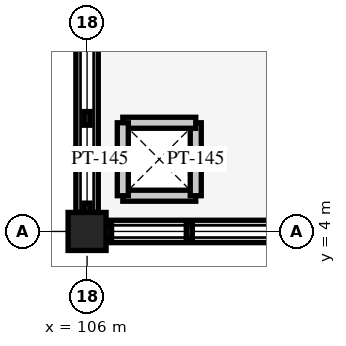
"""IFC4 building model, lengths in metres.
Left out: names, types, materials, properties, quantities, classifications, styles, units other than length and angle.
Written with IfcOpenShell. Run it as: python <this file> out.ifc"""

import sys

from ifc_helpers import new_model, si_unit, direction, frame, frame_2d, origin, origin_2d, place, context, subcontext, project, spatial, rectangle, extrude, element, save


model = new_model("IFC4")
c1 = context("Model", 3, precision=1e-05, world=origin(), true_north=direction((0.0, 1.0)))
c2 = subcontext(c1, "Body", "Model", "MODEL_VIEW")
j1 = project(units=[si_unit("LENGTHUNIT", "METRE"), si_unit("PLANEANGLEUNIT", "RADIAN")], contexts=[c1])
p1 = place(None, origin())
s1 = spatial("IfcSite", under=j1, at=p1, CompositionType="ELEMENT")
p2 = place(p1, origin())
s2 = spatial("IfcBuilding", under=s1, at=p2, CompositionType="ELEMENT")
p3 = place(p2, frame((0.0, 0.0, 4.5)))
s3 = spatial("IfcBuildingStorey", under=s2, at=p3, CompositionType="ELEMENT", Elevation=4.5)
p4 = place(p3, frame((106.0, 4.0, 0.0), z_axis=(0.0, 0.0, 1.0), x_axis=(1.0, 0.0, 0.0)))
e1 = element("IfcColumn", 1, at=p4, inside=s3, PredefinedType="COLUMN", context=c2, shape_type="SweptSolid", body=[
    extrude(rectangle(XDim=0.5, YDim=0.5, at=origin_2d()), origin(), (0.0, 0.0, 1.0), 4.5),
])
p5 = place(p3, frame((111.725, 4.0, 0.0), z_axis=(0.0, 0.0, 1.0), x_axis=(-1.0, 0.0, 0.0)))
e2 = element("IfcWall", 2, at=p5, inside=s3, PredefinedType="SOLIDWALL", context=c2, shape_type="SweptSolid", body=[
    extrude(rectangle(XDim=5.475, YDim=0.295, at=frame_2d((2.738, 0.0))), origin(), (0.0, 0.0, 1.0), 0.16),
])
p6 = place(p3, frame((106.0, 4.25, 0.0), z_axis=(0.0, 0.0, 1.0), x_axis=(0.0, 1.0, 0.0)))
e3 = element("IfcWall", 3, at=p6, inside=s3, PredefinedType="SOLIDWALL", context=c2, shape_type="SweptSolid", body=[
    extrude(rectangle(XDim=4.95, YDim=0.295, at=frame_2d((2.475, 0.0))), origin(), (0.0, 0.0, 1.0), 0.26),
])
for number, where, z_axis, x_axis in (
    (4, (106.47, 4.47, 0.0), (0.0, 0.0, 1.0), (1.0, 0.0, 0.0)),
    (5, (107.43, 4.47, 0.0), (0.0, 0.0, 1.0), (0.0, 1.0, 0.0)),
    (6, (107.43, 5.43, 0.0), (0.0, 0.0, 1.0), (-1.0, 0.0, 0.0)),
    (7, (106.47, 5.43, 0.0), (0.0, 0.0, 1.0), (0.0, -1.0, 0.0)),
):
    element("IfcWall", number, at=place(p3, frame(where, z_axis=z_axis, x_axis=x_axis)), inside=s3, PredefinedType="PARTITIONING", context=c2, shape_type="SweptSolid", body=[
        extrude(rectangle(XDim=0.96, YDim=0.145, at=frame_2d((0.48, 0.0))), origin(), (0.0, 0.0, 1.0), 4.24),
    ])
save(model, sys.argv[1])
